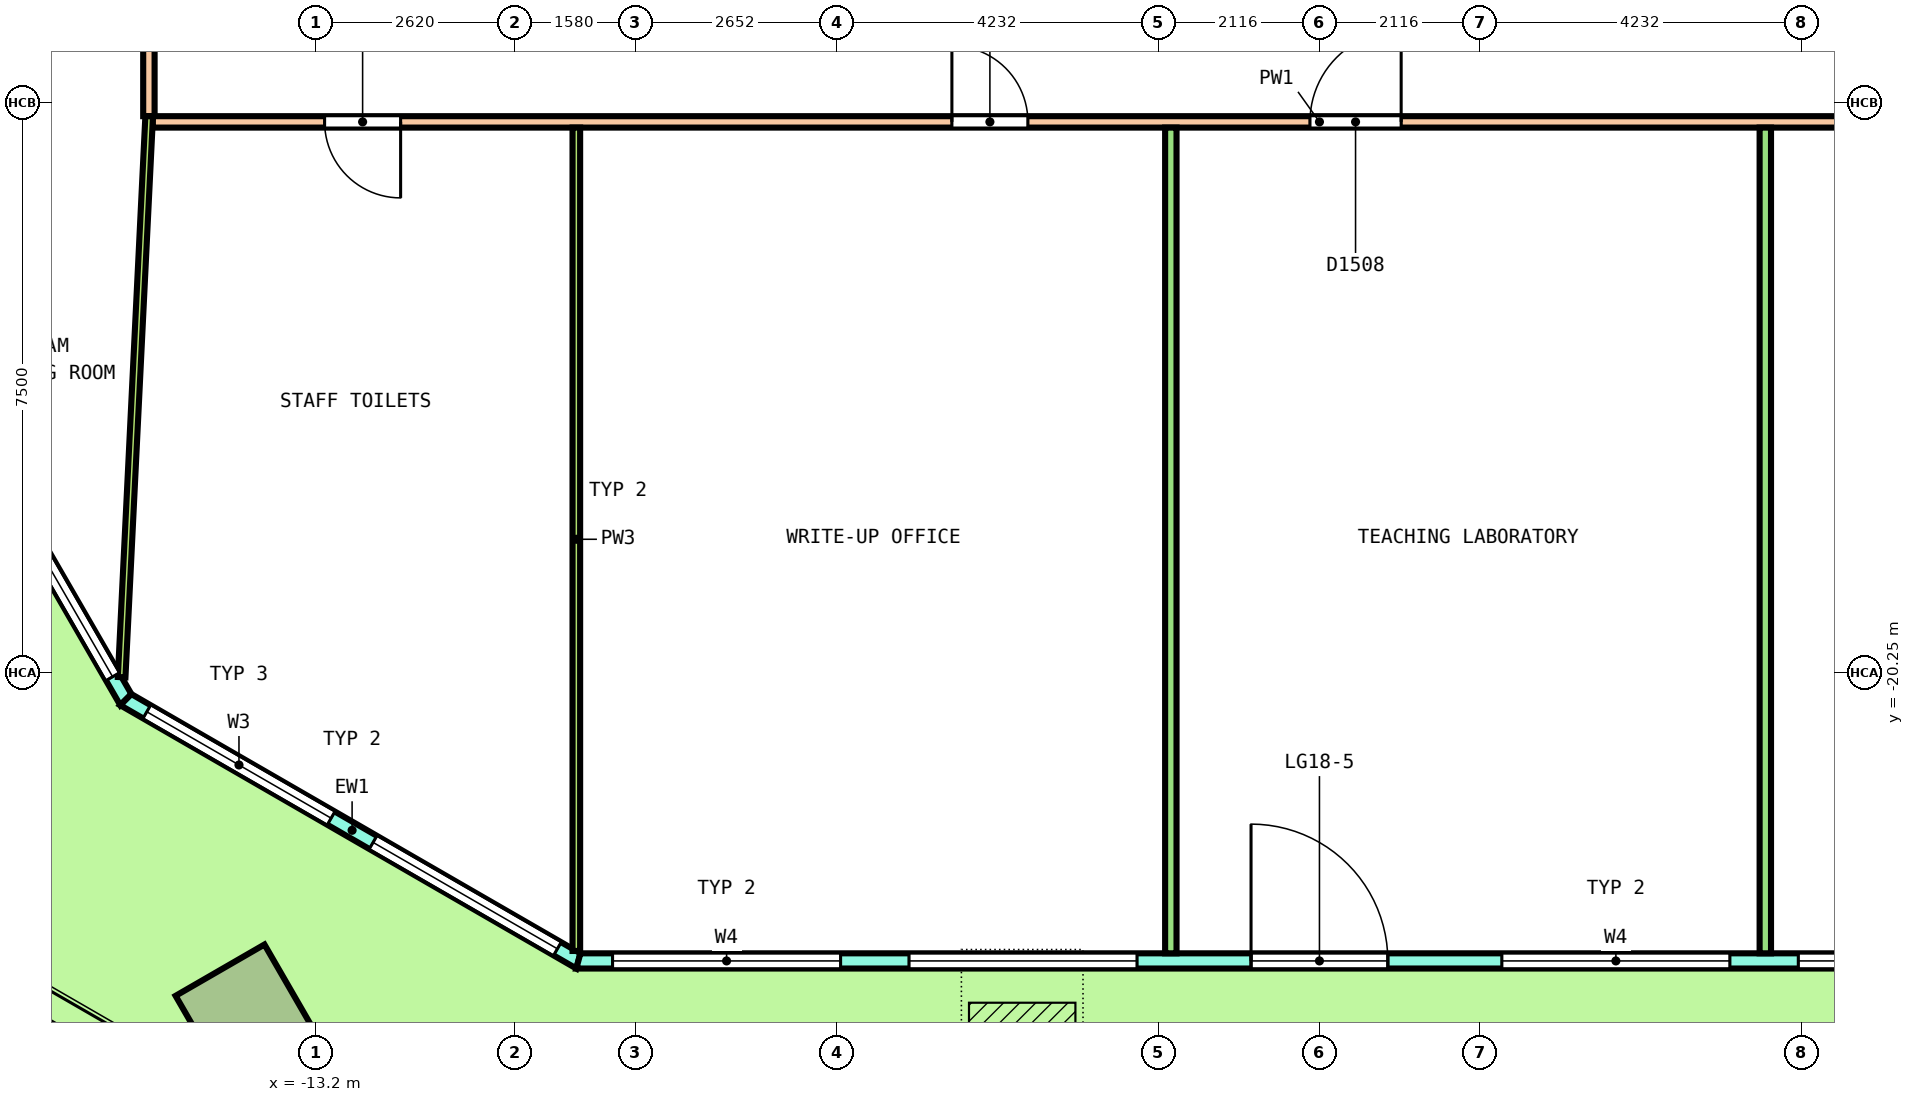
"""IFC4 building model, lengths in metres.
Left out: names, types, materials, properties, quantities, classifications, styles, units other than length and angle.
Written with IfcOpenShell. Run it as: python <this file> out.ifc"""

import sys

from ifc_helpers import new_model, si_unit, direction, frame, frame_2d, origin, origin_2d, place, context, subcontext, project, spatial, polyline, rectangle, outline, extrude, element, fill, save


model = new_model("IFC4")
c1 = context("Model", 3, precision=1e-05, world=origin(), true_north=direction((0.0, 1.0)))
c2 = subcontext(c1, "Body", "Model", "MODEL_VIEW")
j1 = project(units=[si_unit("LENGTHUNIT", "METRE"), si_unit("PLANEANGLEUNIT", "RADIAN")], contexts=[c1])
p1 = place(None, origin())
s1 = spatial("IfcSite", under=j1, at=p1, CompositionType="ELEMENT")
p2 = place(p1, origin())
s2 = spatial("IfcBuilding", under=s1, at=p2, CompositionType="ELEMENT")
p3 = place(p2, frame((0.0, 0.0, 85.2)))
s3 = spatial("IfcBuildingStorey", under=s2, at=p3, CompositionType="ELEMENT", Elevation=85.2)
p4 = place(p3, frame((-14.127, -24.744, 0.0), z_axis=(0.018192817002, -0.0314458625, 0.999339871686), x_axis=(0.866186210709, -0.498729969757, -0.031462130318)))
e1 = element("IfcColumn", 1, at=p4, inside=s3, PredefinedType="COLUMN", context=c2, shape_type="SweptSolid", body=[
    extrude(rectangle(XDim=1.35, YDim=1.35, at=origin_2d()), origin(), (0.0, 0.0, 1.0), 4.053),
])
p5 = place(p3, frame((-25.693, -3.299, 0.0), z_axis=(0.0, 0.0, 1.0), x_axis=(0.499997834957, -0.866026653769, 0.0)))
e2 = element("IfcWall", 2, at=p5, inside=s3, PredefinedType="SOLIDWALL", context=c2, shape_type="SweptSolid", body=[
    extrude(outline(polyline([(-0.027, -0.1), (1.028, -0.1), (2.082, -0.1), (3.136, -0.1), (4.19, -0.1), (5.245, -0.1), (6.299, -0.1), (7.354, -0.1), (8.408, -0.1), (9.462, -0.1), (10.516, -0.1), (11.571, -0.1), (12.625, -0.1), (13.679, -0.1), (14.734, -0.1), (15.788, -0.1), (16.842, -0.1), (17.897, -0.1), (18.951, -0.1), (20.005, -0.1), (19.952, 0.1), (18.903, 0.1), (17.854, 0.1), (16.806, 0.1), (15.757, 0.1), (14.708, 0.1), (13.66, 0.1), (12.611, 0.1), (11.562, 0.1), (10.514, 0.1), (9.465, 0.1), (8.416, 0.1), (7.368, 0.1), (6.319, 0.1), (5.27, 0.1), (4.221, 0.1), (3.173, 0.1), (2.124, 0.1), (1.075, 0.1), (0.027, 0.1), (-0.027, -0.1)])), origin(), (0.0, 0.0, 1.0), 4.1),
])
p6 = place(p5, frame((0.348, 0.0, 0.1)))
e3 = element("IfcOpeningElement", 3, at=p6, cuts=e2, PredefinedType="OPENING", context=c2, shape_type="SweptSolid", body=[
    extrude(rectangle(XDim=3.3, YDim=2.9, at=frame_2d((1.65, 1.45))), frame((0.0, 0.11, 0.0), z_axis=(0.0, -1.0, 0.0), x_axis=(1.0, 0.0, 0.0)), (0.0, 0.0, 1.0), 0.22),
])
p7 = place(p5, frame((4.344, 0.0, 0.1)))
e4 = element("IfcOpeningElement", 4, at=p7, cuts=e2, PredefinedType="OPENING", context=c2, shape_type="SweptSolid", body=[
    extrude(rectangle(XDim=3.3, YDim=2.9, at=frame_2d((1.65, 1.45))), frame((0.0, 0.11, 0.0), z_axis=(0.0, -1.0, 0.0), x_axis=(1.0, 0.0, 0.0)), (0.0, 0.0, 1.0), 0.22),
])
p8 = place(p5, frame((9.089, 0.0, 0.0)))
e5 = element("IfcOpeningElement", 5, at=p8, cuts=e2, PredefinedType="OPENING", context=c2, shape_type="SweptSolid", body=[
    extrude(rectangle(XDim=1.8, YDim=2.4, at=frame_2d((0.9, 1.2))), frame((0.0, 0.11, 0.0), z_axis=(0.0, -1.0, 0.0), x_axis=(1.0, 0.0, 0.0)), (0.0, 0.0, 1.0), 0.22),
])
p9 = place(p5, frame((9.089, 0.0, 2.55)))
e6 = element("IfcOpeningElement", 6, at=p9, cuts=e2, PredefinedType="OPENING", context=c2, shape_type="SweptSolid", body=[
    extrude(rectangle(XDim=1.8, YDim=0.45, at=frame_2d((0.9, 0.225))), frame((0.0, 0.11, 0.0), z_axis=(0.0, -1.0, 0.0), x_axis=(1.0, 0.0, 0.0)), (0.0, 0.0, 1.0), 0.22),
])
p10 = place(p5, frame((12.335, 0.0, 0.1)))
e7 = element("IfcOpeningElement", 7, at=p10, cuts=e2, PredefinedType="OPENING", context=c2, shape_type="SweptSolid", body=[
    extrude(rectangle(XDim=3.3, YDim=2.9, at=frame_2d((1.65, 1.45))), frame((0.0, 0.11, 0.0), z_axis=(0.0, -1.0, 0.0), x_axis=(1.0, 0.0, 0.0)), (0.0, 0.0, 1.0), 0.22),
])
p11 = place(p5, frame((16.331, 0.0, 0.1)))
e8 = element("IfcOpeningElement", 8, at=p11, cuts=e2, PredefinedType="OPENING", context=c2, shape_type="SweptSolid", body=[
    extrude(rectangle(XDim=3.3, YDim=2.9, at=frame_2d((1.65, 1.45))), frame((0.0, 0.11, 0.0), z_axis=(0.0, -1.0, 0.0), x_axis=(1.0, 0.0, 0.0)), (0.0, 0.0, 1.0), 0.22),
])
p12 = place(p3, frame((-15.703, -20.601, 0.0), z_axis=(0.0, 0.0, 1.0), x_axis=(0.866029458321, -0.49999297727, 0.0)))
e9 = element("IfcWall", 9, at=p12, inside=s3, PredefinedType="SOLIDWALL", context=c2, shape_type="SweptSolid", body=[
    extrude(outline(polyline([(-0.027, -0.1), (1.128, -0.1), (2.282, -0.1), (3.437, -0.1), (4.592, -0.1), (5.747, -0.1), (6.901, -0.1), (6.848, 0.1), (5.711, 0.1), (4.574, 0.1), (3.437, 0.1), (2.301, 0.1), (1.164, 0.1), (0.027, 0.1), (-0.027, -0.1)])), origin(), (0.0, 0.0, 1.0), 4.1),
])
p13 = place(p12, frame((0.319, 0.0, 0.1)))
e10 = element("IfcOpeningElement", 10, at=p13, cuts=e9, PredefinedType="OPENING", context=c2, shape_type="SweptSolid", body=[
    extrude(rectangle(XDim=2.8, YDim=2.9, at=frame_2d((1.4, 1.45))), frame((0.0, 0.11, 0.0), z_axis=(0.0, -1.0, 0.0), x_axis=(1.0, 0.0, 0.0)), (0.0, 0.0, 1.0), 0.22),
])
p14 = place(p12, frame((3.756, 0.0, 0.1)))
e11 = element("IfcOpeningElement", 11, at=p14, cuts=e9, PredefinedType="OPENING", context=c2, shape_type="SweptSolid", body=[
    extrude(rectangle(XDim=2.8, YDim=2.9, at=frame_2d((1.4, 1.45))), frame((0.0, 0.11, 0.0), z_axis=(0.0, -1.0, 0.0), x_axis=(1.0, 0.0, 0.0)), (0.0, 0.0, 1.0), 0.22),
])
p15 = place(p3, frame((-9.75, -24.038, 0.0), z_axis=(0.0, 0.0, 1.0), x_axis=(1.0, 0.0, 0.0)))
e12 = element("IfcWall", 12, at=p15, inside=s3, PredefinedType="SOLIDWALL", context=c2, shape_type="SweptSolid", body=[
    extrude(outline(polyline([(-0.027, -0.1), (1.002, -0.1), (2.031, -0.1), (3.061, -0.1), (4.09, -0.1), (5.119, -0.1), (6.148, -0.1), (7.177, -0.1), (8.206, -0.1), (9.235, -0.1), (10.264, -0.1), (11.293, -0.1), (12.323, -0.1), (13.352, -0.1), (14.381, -0.1), (15.41, -0.1), (16.439, -0.1), (17.468, -0.1), (18.497, -0.1), (19.526, -0.1), (19.473, 0.1), (18.449, 0.1), (17.426, 0.1), (16.402, 0.1), (15.379, 0.1), (14.355, 0.1), (13.332, 0.1), (12.308, 0.1), (11.285, 0.1), (10.261, 0.1), (9.238, 0.1), (8.215, 0.1), (7.191, 0.1), (6.168, 0.1), (5.144, 0.1), (4.121, 0.1), (3.097, 0.1), (2.074, 0.1), (1.05, 0.1), (0.027, 0.1), (-0.027, -0.1)])), origin(), (0.0, 0.0, 1.0), 4.1),
])
p16 = place(p15, frame((0.45, 0.0, 0.1)))
e13 = element("IfcOpeningElement", 13, at=p16, cuts=e12, PredefinedType="OPENING", context=c2, shape_type="SweptSolid", body=[
    extrude(rectangle(XDim=3.0, YDim=2.9, at=frame_2d((1.5, 1.45))), frame((0.0, 0.11, 0.0), z_axis=(0.0, -1.0, 0.0), x_axis=(1.0, 0.0, 0.0)), (0.0, 0.0, 1.0), 0.22),
])
p17 = place(p15, frame((4.35, 0.0, 0.1)))
e14 = element("IfcOpeningElement", 14, at=p17, cuts=e12, PredefinedType="OPENING", context=c2, shape_type="SweptSolid", body=[
    extrude(rectangle(XDim=3.0, YDim=2.9, at=frame_2d((1.5, 1.45))), frame((0.0, 0.11, 0.0), z_axis=(0.0, -1.0, 0.0), x_axis=(1.0, 0.0, 0.0)), (0.0, 0.0, 1.0), 0.22),
])
p18 = place(p15, frame((8.85, 0.0, 0.0)))
e15 = element("IfcOpeningElement", 15, at=p18, cuts=e12, PredefinedType="OPENING", context=c2, shape_type="SweptSolid", body=[
    extrude(rectangle(XDim=1.8, YDim=2.4, at=frame_2d((0.9, 1.2))), frame((0.0, 0.11, 0.0), z_axis=(0.0, -1.0, 0.0), x_axis=(1.0, 0.0, 0.0)), (0.0, 0.0, 1.0), 0.22),
])
p19 = place(p15, frame((8.85, 0.0, 2.55)))
e16 = element("IfcOpeningElement", 16, at=p19, cuts=e12, PredefinedType="OPENING", context=c2, shape_type="SweptSolid", body=[
    extrude(rectangle(XDim=1.8, YDim=0.45, at=frame_2d((0.9, 0.225))), frame((0.0, 0.11, 0.0), z_axis=(0.0, -1.0, 0.0), x_axis=(1.0, 0.0, 0.0)), (0.0, 0.0, 1.0), 0.22),
])
p20 = place(p15, frame((12.15, 0.0, 0.1)))
e17 = element("IfcOpeningElement", 17, at=p20, cuts=e12, PredefinedType="OPENING", context=c2, shape_type="SweptSolid", body=[
    extrude(rectangle(XDim=3.0, YDim=2.9, at=frame_2d((1.5, 1.45))), frame((0.0, 0.11, 0.0), z_axis=(0.0, -1.0, 0.0), x_axis=(1.0, 0.0, 0.0)), (0.0, 0.0, 1.0), 0.22),
])
p21 = place(p15, frame((16.05, 0.0, 0.1)))
e18 = element("IfcOpeningElement", 18, at=p21, cuts=e12, PredefinedType="OPENING", context=c2, shape_type="SweptSolid", body=[
    extrude(rectangle(XDim=3.0, YDim=2.9, at=frame_2d((1.5, 1.45))), frame((0.0, 0.11, 0.0), z_axis=(0.0, -1.0, 0.0), x_axis=(1.0, 0.0, 0.0)), (0.0, 0.0, 1.0), 0.22),
])
p22 = place(p3, frame((-15.4, -12.925, 0.0), z_axis=(0.0, 0.0, 1.0), x_axis=(0.0, 1.0, 0.0)))
e19 = element("IfcWall", 19, at=p22, inside=s3, PredefinedType="PARTITIONING", context=c2, shape_type="SweptSolid", body=[
    extrude(rectangle(XDim=25.85, YDim=0.15, at=frame_2d((12.925, 0.0))), origin(), (0.0, 0.0, 1.0), 3.05),
])
p23 = place(p22, frame((21.292, 0.0, 0.0)))
e20 = element("IfcOpeningElement", 20, at=p23, cuts=e19, PredefinedType="OPENING", context=c2, shape_type="SweptSolid", body=[
    extrude(rectangle(XDim=1.2, YDim=2.1, at=frame_2d((0.6, 1.05))), frame((0.0, 0.085, 0.0), z_axis=(0.0, -1.0, 0.0), x_axis=(1.0, 0.0, 0.0)), (0.0, 0.0, 1.0), 0.17),
])
p24 = place(p22, frame((15.393, 0.0, 0.0)))
e21 = element("IfcOpeningElement", 21, at=p24, cuts=e19, PredefinedType="OPENING", context=c2, shape_type="SweptSolid", body=[
    extrude(rectangle(XDim=1.2, YDim=2.1, at=frame_2d((0.6, 1.05))), frame((0.0, 0.085, 0.0), z_axis=(0.0, -1.0, 0.0), x_axis=(1.0, 0.0, 0.0)), (0.0, 0.0, 1.0), 0.17),
])
p25 = place(p22, frame((3.503, 0.0, 0.0)))
e22 = element("IfcOpeningElement", 22, at=p25, cuts=e19, PredefinedType="OPENING", context=c2, shape_type="SweptSolid", body=[
    extrude(rectangle(XDim=1.2, YDim=2.1, at=frame_2d((0.6, 1.05))), frame((0.0, 0.085, 0.0), z_axis=(0.0, -1.0, 0.0), x_axis=(1.0, 0.0, 0.0)), (0.0, 0.0, 1.0), 0.17),
])
p26 = place(p3, frame((-15.35, -13.0, 0.0), z_axis=(0.0, 0.0, 1.0), x_axis=(1.0, 0.0, 0.0)))
e23 = element("IfcWall", 23, at=p26, inside=s3, PredefinedType="PARTITIONING", context=c2, shape_type="SweptSolid", body=[
    extrude(rectangle(XDim=30.7, YDim=0.15, at=frame_2d((15.35, 0.0))), origin(), (0.0, 0.0, 1.0), 3.05),
])
p27 = place(p26, frame((2.262, 0.0, 0.0)))
e24 = element("IfcOpeningElement", 24, at=p27, cuts=e23, PredefinedType="OPENING", context=c2, shape_type="SweptSolid", body=[
    extrude(rectangle(XDim=1.0, YDim=2.1, at=frame_2d((0.5, 1.05))), frame((0.0, 0.085, 0.0), z_axis=(0.0, -1.0, 0.0), x_axis=(1.0, 0.0, 0.0)), (0.0, 0.0, 1.0), 0.17),
])
p28 = place(p26, frame((10.514, 0.0, 0.0)))
e25 = element("IfcOpeningElement", 25, at=p28, cuts=e23, PredefinedType="OPENING", context=c2, shape_type="SweptSolid", body=[
    extrude(rectangle(XDim=1.0, YDim=2.1, at=frame_2d((0.5, 1.05))), frame((0.0, 0.085, 0.0), z_axis=(0.0, -1.0, 0.0), x_axis=(1.0, 0.0, 0.0)), (0.0, 0.0, 1.0), 0.17),
])
p29 = place(p26, frame((15.225, 0.0, 0.0)))
e26 = element("IfcOpeningElement", 26, at=p29, cuts=e23, PredefinedType="OPENING", context=c2, shape_type="SweptSolid", body=[
    extrude(rectangle(XDim=1.2, YDim=2.1, at=frame_2d((0.6, 1.05))), frame((0.0, 0.085, 0.0), z_axis=(0.0, -1.0, 0.0), x_axis=(1.0, 0.0, 0.0)), (0.0, 0.0, 1.0), 0.17),
])
p30 = place(p26, frame((22.819, 0.0, 0.0)))
e27 = element("IfcOpeningElement", 27, at=p30, cuts=e23, PredefinedType="OPENING", context=c2, shape_type="SweptSolid", body=[
    extrude(rectangle(XDim=1.2, YDim=2.1, at=frame_2d((0.6, 1.05))), frame((0.0, 0.085, 0.0), z_axis=(0.0, -1.0, 0.0), x_axis=(1.0, 0.0, 0.0)), (0.0, 0.0, 1.0), 0.17),
])
p31 = place(p26, frame((28.8, 0.0, 0.0)))
e28 = element("IfcOpeningElement", 28, at=p31, cuts=e23, PredefinedType="OPENING", context=c2, shape_type="SweptSolid", body=[
    extrude(rectangle(XDim=1.0, YDim=2.1, at=frame_2d((0.5, 1.05))), frame((0.0, 0.085, 0.0), z_axis=(0.0, -1.0, 0.0), x_axis=(1.0, 0.0, 0.0)), (0.0, 0.0, 1.0), 0.17),
])
for number, where, z_axis, x_axis in (
    (29, (-1.955, -23.938, 0.0), (0.0, 0.0, 1.0), (0.0, 1.0, 0.0)),
    (30, (5.866, -23.938, 0.0), (0.0, 0.0, 1.0), (0.0, 1.0, 0.0)),
):
    element("IfcWall", number, at=place(p3, frame(where, z_axis=z_axis, x_axis=x_axis)), inside=s3, PredefinedType="PARTITIONING", context=c2, shape_type="SweptSolid", body=[
        extrude(rectangle(XDim=10.863, YDim=0.15, at=frame_2d((5.432, 0.0))), origin(), (0.0, 0.0, 1.0), 3.05),
    ])
p32 = place(p3, frame((-15.759, -20.305, 0.0), z_axis=(0.0, 0.0, 1.0), x_axis=(0.049031263992, 0.998797244265, 0.0)))
e31 = element("IfcWall", 31, at=p32, inside=s3, PredefinedType="PARTITIONING", context=c2, shape_type="SweptSolid", body=[
    extrude(rectangle(XDim=7.389, YDim=0.1, at=frame_2d((3.695, 0.0))), origin(), (0.0, 0.0, 1.0), 3.05),
])
p33 = place(p3, frame((-9.777, -23.907, 0.0), z_axis=(0.0, 0.0, 1.0), x_axis=(0.0, 1.0, 0.0)))
e32 = element("IfcWall", 32, at=p33, inside=s3, PredefinedType="PARTITIONING", context=c2, shape_type="SweptSolid", body=[
    extrude(rectangle(XDim=10.832, YDim=0.1, at=frame_2d((5.416, 0.0))), origin(), (0.0, 0.0, 1.0), 3.05),
])
p34 = place(p11, origin())
e33 = element("IfcWindow", 33, at=p34, inside=s3, PartitioningType="SINGLE_PANEL", PredefinedType="WINDOW", context=c2, shape_type="SweptSolid", body=[
    extrude(rectangle(XDim=3.3, YDim=2.9, at=frame_2d((1.65, 1.45))), frame((0.0, 0.03, 0.0), z_axis=(0.0, -1.0, 0.0), x_axis=(1.0, 0.0, 0.0)), (0.0, 0.0, 1.0), 0.06),
])
fill(e8, e33)
p35 = place(p13, origin())
e34 = element("IfcWindow", 34, at=p35, inside=s3, PartitioningType="SINGLE_PANEL", PredefinedType="WINDOW", context=c2, shape_type="SweptSolid", body=[
    extrude(rectangle(XDim=2.8, YDim=2.9, at=frame_2d((1.4, 1.45))), frame((0.0, 0.03, 0.0), z_axis=(0.0, -1.0, 0.0), x_axis=(1.0, 0.0, 0.0)), (0.0, 0.0, 1.0), 0.06),
])
fill(e10, e34)
p36 = place(p14, origin())
e35 = element("IfcWindow", 35, at=p36, inside=s3, PartitioningType="SINGLE_PANEL", PredefinedType="WINDOW", context=c2, shape_type="SweptSolid", body=[
    extrude(rectangle(XDim=2.8, YDim=2.9, at=frame_2d((1.4, 1.45))), frame((0.0, 0.03, 0.0), z_axis=(0.0, -1.0, 0.0), x_axis=(1.0, 0.0, 0.0)), (0.0, 0.0, 1.0), 0.06),
])
fill(e11, e35)
p37 = place(p16, origin())
e36 = element("IfcWindow", 36, at=p37, inside=s3, PartitioningType="SINGLE_PANEL", PredefinedType="WINDOW", context=c2, shape_type="SweptSolid", body=[
    extrude(rectangle(XDim=3.0, YDim=2.9, at=frame_2d((1.5, 1.45))), frame((0.0, 0.03, 0.0), z_axis=(0.0, -1.0, 0.0), x_axis=(1.0, 0.0, 0.0)), (0.0, 0.0, 1.0), 0.06),
])
fill(e13, e36)
p38 = place(p17, origin())
e37 = element("IfcWindow", 37, at=p38, inside=s3, PartitioningType="SINGLE_PANEL", PredefinedType="WINDOW", context=c2, shape_type="SweptSolid", body=[
    extrude(rectangle(XDim=3.0, YDim=2.9, at=frame_2d((1.5, 1.45))), frame((0.0, 0.03, 0.0), z_axis=(0.0, -1.0, 0.0), x_axis=(1.0, 0.0, 0.0)), (0.0, 0.0, 1.0), 0.06),
])
fill(e14, e37)
p39 = place(p18, origin())
e38 = element("IfcDoor", 38, at=p39, inside=s3, OperationType="DOUBLE_DOOR_SINGLE_SWING", PredefinedType="DOOR", context=c2, shape_type="SweptSolid", body=[
    extrude(rectangle(XDim=1.8, YDim=2.4, at=frame_2d((0.9, 1.2))), frame((0.0, 0.025, 0.0), z_axis=(0.0, -1.0, 0.0), x_axis=(1.0, 0.0, 0.0)), (0.0, 0.0, 1.0), 0.05),
])
fill(e15, e38)
p40 = place(p19, origin())
e39 = element("IfcWindow", 39, at=p40, inside=s3, PartitioningType="SINGLE_PANEL", PredefinedType="WINDOW", context=c2, shape_type="SweptSolid", body=[
    extrude(rectangle(XDim=1.8, YDim=0.45, at=frame_2d((0.9, 0.225))), frame((0.0, 0.03, 0.0), z_axis=(0.0, -1.0, 0.0), x_axis=(1.0, 0.0, 0.0)), (0.0, 0.0, 1.0), 0.06),
])
fill(e16, e39)
p41 = place(p20, origin())
e40 = element("IfcWindow", 40, at=p41, inside=s3, PartitioningType="SINGLE_PANEL", PredefinedType="WINDOW", context=c2, shape_type="SweptSolid", body=[
    extrude(rectangle(XDim=3.0, YDim=2.9, at=frame_2d((1.5, 1.45))), frame((0.0, 0.03, 0.0), z_axis=(0.0, -1.0, 0.0), x_axis=(1.0, 0.0, 0.0)), (0.0, 0.0, 1.0), 0.06),
])
fill(e17, e40)
p42 = place(p21, origin())
e41 = element("IfcWindow", 41, at=p42, inside=s3, PartitioningType="SINGLE_PANEL", PredefinedType="WINDOW", context=c2, shape_type="SweptSolid", body=[
    extrude(rectangle(XDim=3.0, YDim=2.9, at=frame_2d((1.5, 1.45))), frame((0.0, 0.03, 0.0), z_axis=(0.0, -1.0, 0.0), x_axis=(1.0, 0.0, 0.0)), (0.0, 0.0, 1.0), 0.06),
])
fill(e18, e41)
p43 = place(p27, origin())
e42 = element("IfcDoor", 42, at=p43, inside=s3, OperationType="SINGLE_SWING_LEFT", PredefinedType="DOOR", context=c2, shape_type="SweptSolid", body=[
    extrude(rectangle(XDim=1.0, YDim=2.1, at=frame_2d((0.5, 1.05))), frame((0.0, 0.025, 0.0), z_axis=(0.0, -1.0, 0.0), x_axis=(1.0, 0.0, 0.0)), (0.0, 0.0, 1.0), 0.05),
])
fill(e24, e42)
p44 = place(p28, origin())
e43 = element("IfcDoor", 43, at=p44, inside=s3, OperationType="SINGLE_SWING_LEFT", PredefinedType="DOOR", context=c2, shape_type="SweptSolid", body=[
    extrude(rectangle(XDim=1.0, YDim=2.1, at=frame_2d((0.5, 1.05))), frame((0.0, 0.025, 0.0), z_axis=(0.0, -1.0, 0.0), x_axis=(1.0, 0.0, 0.0)), (0.0, 0.0, 1.0), 0.05),
])
fill(e25, e43)
p45 = place(p29, origin())
e44 = element("IfcDoor", 44, at=p45, inside=s3, OperationType="DOUBLE_DOOR_SINGLE_SWING", PredefinedType="DOOR", context=c2, shape_type="SweptSolid", body=[
    extrude(rectangle(XDim=1.2, YDim=2.1, at=frame_2d((0.6, 1.05))), frame((0.0, 0.025, 0.0), z_axis=(0.0, -1.0, 0.0), x_axis=(1.0, 0.0, 0.0)), (0.0, 0.0, 1.0), 0.05),
])
fill(e26, e44)
save(model, sys.argv[1])
